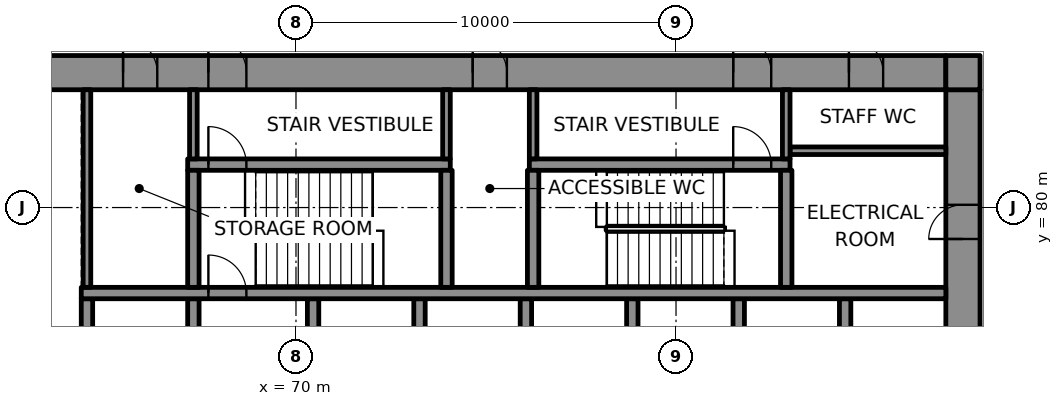
"""IFC4 building model, lengths in metres.
Left out: names, types, materials, properties, quantities, classifications, styles, units other than length and angle.
Written with IfcOpenShell. Run it as: python <this file> out.ifc"""

import sys

from ifc_helpers import new_model, si_unit, direction, frame, frame_2d, origin, place, context, subcontext, project, spatial, rectangle, extrude, element, fill, save


model = new_model("IFC4")
c1 = context("Model", 3, precision=1e-05, world=origin(), true_north=direction((0.0, 1.0)))
c2 = subcontext(c1, "Body", "Model", "MODEL_VIEW")
j1 = project(units=[si_unit("LENGTHUNIT", "METRE"), si_unit("PLANEANGLEUNIT", "RADIAN")], contexts=[c1])
p1 = place(None, origin())
s1 = spatial("IfcSite", under=j1, at=p1, CompositionType="ELEMENT")
p2 = place(p1, origin())
s2 = spatial("IfcBuilding", under=s1, at=p2, CompositionType="ELEMENT")
p3 = place(p2, frame((0.0, 0.0, 132.4)))
s3 = spatial("IfcBuildingStorey", under=s2, at=p3, CompositionType="ELEMENT", Elevation=132.4)
p4 = place(p3, frame((62.0, 83.55, 0.0), z_axis=(0.0, 0.0, 1.0), x_axis=(1.0, 0.0, 0.0)))
e1 = element("IfcWall", 1, at=p4, inside=s3, PredefinedType="SHEAR", context=c2, shape_type="SweptSolid", body=[
    extrude(rectangle(XDim=25.1, YDim=0.9, at=frame_2d((12.55, 0.0))), origin(), (0.0, 0.0, 1.0), 4.0),
])
p5 = place(p4, frame((5.695, 0.0, 0.0)))
e2 = element("IfcOpeningElement", 2, at=p5, cuts=e1, PredefinedType="OPENING", context=c2, shape_type="SweptSolid", body=[
    extrude(rectangle(XDim=1.0, YDim=2.1, at=frame_2d((0.5, 1.05))), frame((0.0, 0.46, 0.0), z_axis=(0.0, -1.0, 0.0), x_axis=(1.0, 0.0, 0.0)), (0.0, 0.0, 1.0), 0.92),
])
p6 = place(p4, frame((19.505, 0.0, 0.0)))
e3 = element("IfcOpeningElement", 3, at=p6, cuts=e1, PredefinedType="OPENING", context=c2, shape_type="SweptSolid", body=[
    extrude(rectangle(XDim=1.0, YDim=2.1, at=frame_2d((0.5, 1.05))), frame((0.0, 0.46, 0.0), z_axis=(0.0, -1.0, 0.0), x_axis=(1.0, 0.0, 0.0)), (0.0, 0.0, 1.0), 0.92),
])
p7 = place(p4, frame((3.45, 0.0, 0.0)))
e4 = element("IfcOpeningElement", 4, at=p7, cuts=e1, PredefinedType="OPENING", context=c2, shape_type="SweptSolid", body=[
    extrude(rectangle(XDim=0.9, YDim=2.1, at=frame_2d((0.45, 1.05))), frame((0.0, 0.46, 0.0), z_axis=(0.0, -1.0, 0.0), x_axis=(1.0, 0.0, 0.0)), (0.0, 0.0, 1.0), 0.92),
])
p8 = place(p4, frame((12.65, 0.0, 0.0)))
e5 = element("IfcOpeningElement", 5, at=p8, cuts=e1, PredefinedType="OPENING", context=c2, shape_type="SweptSolid", body=[
    extrude(rectangle(XDim=0.9, YDim=2.1, at=frame_2d((0.45, 1.05))), frame((0.0, 0.46, 0.0), z_axis=(0.0, -1.0, 0.0), x_axis=(1.0, 0.0, 0.0)), (0.0, 0.0, 1.0), 0.92),
])
p9 = place(p4, frame((22.55, 0.0, 0.0)))
e6 = element("IfcOpeningElement", 6, at=p9, cuts=e1, PredefinedType="OPENING", context=c2, shape_type="SweptSolid", body=[
    extrude(rectangle(XDim=0.9, YDim=2.1, at=frame_2d((0.45, 1.05))), frame((0.0, 0.46, 0.0), z_axis=(0.0, -1.0, 0.0), x_axis=(1.0, 0.0, 0.0)), (0.0, 0.0, 1.0), 0.92),
])
p10 = place(p3, frame((87.55, 66.9, 0.0), z_axis=(0.0, 0.0, 1.0), x_axis=(0.0, 1.0, 0.0)))
e7 = element("IfcWall", 7, at=p10, inside=s3, PredefinedType="SHEAR", context=c2, shape_type="SweptSolid", body=[
    extrude(rectangle(XDim=16.2, YDim=0.9, at=frame_2d((8.1, 0.0))), origin(), (0.0, 0.0, 1.0), 4.0),
])
p11 = place(p10, frame((5.5, 0.0, 0.0)))
e8 = element("IfcOpeningElement", 8, at=p11, cuts=e7, PredefinedType="OPENING", context=c2, shape_type="SweptSolid", body=[
    extrude(rectangle(XDim=1.8, YDim=2.1, at=frame_2d((0.9, 1.05))), frame((0.0, 0.46, 0.0), z_axis=(0.0, -1.0, 0.0), x_axis=(1.0, 0.0, 0.0)), (0.0, 0.0, 1.0), 0.92),
])
p12 = place(p10, frame((12.272, 0.0, 0.0)))
e9 = element("IfcOpeningElement", 9, at=p12, cuts=e7, PredefinedType="OPENING", context=c2, shape_type="SweptSolid", body=[
    extrude(rectangle(XDim=0.9, YDim=2.1, at=frame_2d((0.45, 1.05))), frame((0.0, 0.46, 0.0), z_axis=(0.0, -1.0, 0.0), x_axis=(1.0, 0.0, 0.0)), (0.0, 0.0, 1.0), 0.92),
])
for number, where, z_axis, x_axis in (
    (10, (64.5, 75.0, 0.0), (0.0, 0.0, 1.0), (0.0, 1.0, 0.0)),
    (11, (67.3, 75.0, 0.0), (0.0, 0.0, 1.0), (0.0, 1.0, 0.0)),
):
    element("IfcWall", number, at=place(p3, frame(where, z_axis=z_axis, x_axis=x_axis)), inside=s3, PredefinedType="SHEAR", context=c2, shape_type="SweptSolid", body=[
        extrude(rectangle(XDim=2.6, YDim=0.3, at=frame_2d((1.3, 0.0))), origin(), (0.0, 0.0, 1.0), 4.0),
    ])
p13 = place(p3, frame((70.45, 75.0, 0.0), z_axis=(0.0, 0.0, 1.0), x_axis=(0.0, 1.0, 0.0)))
e12 = element("IfcWall", 12, at=p13, inside=s3, PredefinedType="SHEAR", context=c2, shape_type="SweptSolid", body=[
    extrude(rectangle(XDim=2.6, YDim=0.3, at=frame_2d((1.3, 0.0))), origin(), (0.0, 0.0, 1.0), 4.0),
])
p14 = place(p13, frame((0.15, 0.0, 0.0)))
e13 = element("IfcOpeningElement", 13, at=p14, cuts=e12, PredefinedType="OPENING", context=c2, shape_type="SweptSolid", body=[
    extrude(rectangle(XDim=1.1, YDim=2.1, at=frame_2d((0.55, 1.05))), frame((0.0, 0.16, 0.0), z_axis=(0.0, -1.0, 0.0), x_axis=(1.0, 0.0, 0.0)), (0.0, 0.0, 1.0), 0.32),
])
for number, where, z_axis, x_axis in (
    (14, (73.25, 75.0, 0.0), (0.0, 0.0, 1.0), (0.0, 1.0, 0.0)),
    (15, (76.05, 75.0, 0.0), (0.0, 0.0, 1.0), (0.0, 1.0, 0.0)),
    (16, (78.85, 75.0, 0.0), (0.0, 0.0, 1.0), (0.0, 1.0, 0.0)),
    (17, (81.65, 75.0, 0.0), (0.0, 0.0, 1.0), (0.0, 1.0, 0.0)),
    (18, (84.45, 75.0, 0.0), (0.0, 0.0, 1.0), (0.0, 1.0, 0.0)),
):
    element("IfcWall", number, at=place(p3, frame(where, z_axis=z_axis, x_axis=x_axis)), inside=s3, PredefinedType="SHEAR", context=c2, shape_type="SweptSolid", body=[
        extrude(rectangle(XDim=2.6, YDim=0.3, at=frame_2d((1.3, 0.0))), origin(), (0.0, 0.0, 1.0), 4.0),
    ])
p15 = place(p3, frame((64.35, 77.75, 0.0), z_axis=(0.0, 0.0, 1.0), x_axis=(1.0, 0.0, 0.0)))
e19 = element("IfcWall", 19, at=p15, inside=s3, PredefinedType="SHEAR", context=c2, shape_type="SweptSolid", body=[
    extrude(rectangle(XDim=22.75, YDim=0.3, at=frame_2d((11.375, 0.0))), origin(), (0.0, 0.0, 1.0), 4.0),
])
p16 = place(p15, frame((3.345, 0.0, 0.0)))
e20 = element("IfcOpeningElement", 20, at=p16, cuts=e19, PredefinedType="OPENING", context=c2, shape_type="SweptSolid", body=[
    extrude(rectangle(XDim=1.0, YDim=2.1, at=frame_2d((0.5, 1.05))), frame((0.0, 0.16, 0.0), z_axis=(0.0, -1.0, 0.0), x_axis=(1.0, 0.0, 0.0)), (0.0, 0.0, 1.0), 0.32),
])
p17 = place(p3, frame((67.15, 81.13, 0.0), z_axis=(0.0, 0.0, 1.0), x_axis=(1.0, 0.0, 0.0)))
e21 = element("IfcWall", 21, at=p17, inside=s3, PredefinedType="SHEAR", context=c2, shape_type="SweptSolid", body=[
    extrude(rectangle(XDim=6.91, YDim=0.3, at=frame_2d((3.455, 0.0))), origin(), (0.0, 0.0, 1.0), 4.0),
])
p18 = place(p17, frame((0.545, 0.0, 0.0)))
e22 = element("IfcOpeningElement", 22, at=p18, cuts=e21, PredefinedType="OPENING", context=c2, shape_type="SweptSolid", body=[
    extrude(rectangle(XDim=1.0, YDim=2.1, at=frame_2d((0.5, 1.05))), frame((0.0, 0.16, 0.0), z_axis=(0.0, -1.0, 0.0), x_axis=(1.0, 0.0, 0.0)), (0.0, 0.0, 1.0), 0.32),
])
p19 = place(p3, frame((76.14, 81.13, 0.0), z_axis=(0.0, 0.0, 1.0), x_axis=(1.0, 0.0, 0.0)))
e23 = element("IfcWall", 23, at=p19, inside=s3, PredefinedType="SHEAR", context=c2, shape_type="SweptSolid", body=[
    extrude(rectangle(XDim=6.86, YDim=0.3, at=frame_2d((3.43, 0.0))), origin(), (0.0, 0.0, 1.0), 4.0),
])
p20 = place(p19, frame((5.365, 0.0, 0.0)))
e24 = element("IfcOpeningElement", 24, at=p20, cuts=e23, PredefinedType="OPENING", context=c2, shape_type="SweptSolid", body=[
    extrude(rectangle(XDim=1.0, YDim=2.1, at=frame_2d((0.5, 1.05))), frame((0.0, 0.16, 0.0), z_axis=(0.0, -1.0, 0.0), x_axis=(1.0, 0.0, 0.0)), (0.0, 0.0, 1.0), 0.32),
])
for number, where, z_axis, x_axis in (
    (25, (67.3, 77.9, 0.0), (0.0, 0.0, 1.0), (0.0, 1.0, 0.0)),
    (26, (73.96, 77.9, 0.0), (0.0, 0.0, 1.0), (0.0, 1.0, 0.0)),
    (27, (76.24, 77.9, 0.0), (0.0, 0.0, 1.0), (0.0, 1.0, 0.0)),
    (28, (82.9, 77.9, 0.0), (0.0, 0.0, 1.0), (0.0, 1.0, 0.0)),
):
    element("IfcWall", number, at=place(p3, frame(where, z_axis=z_axis, x_axis=x_axis)), inside=s3, PredefinedType="SHEAR", context=c2, shape_type="SweptSolid", body=[
        extrude(rectangle(XDim=3.08, YDim=0.3, at=frame_2d((1.54, 0.0))), origin(), (0.0, 0.0, 1.0), 4.0),
    ])
p21 = place(p3, frame((87.1, 83.55, 0.0), z_axis=(0.0, 0.0, 1.0), x_axis=(1.0, 0.0, 0.0)))
e29 = element("IfcWall", 29, at=p21, inside=s3, PredefinedType="SHEAR", context=c2, shape_type="SweptSolid", body=[
    extrude(rectangle(XDim=0.9, YDim=0.9, at=frame_2d((0.45, 0.0))), origin(), (0.0, 0.0, 1.0), 4.0),
])
p22 = place(p3, frame((83.0, 81.495, 0.0), z_axis=(0.0, 0.0, 1.0), x_axis=(1.0, 0.0, 0.0)))
e30 = element("IfcWall", 30, at=p22, inside=s3, PredefinedType="PARTITIONING", context=c2, shape_type="SweptSolid", body=[
    extrude(rectangle(XDim=4.1, YDim=0.2, at=frame_2d((2.05, 0.0))), origin(), (0.0, 0.0, 1.0), 4.0),
])
p23 = place(p3, frame((64.5, 77.9, 0.0), z_axis=(0.0, 0.0, 1.0), x_axis=(0.0, 1.0, 0.0)))
e31 = element("IfcWall", 31, at=p23, inside=s3, PredefinedType="PARTITIONING", context=c2, shape_type="SweptSolid", body=[
    extrude(rectangle(XDim=5.2, YDim=0.2, at=frame_2d((2.6, 0.0))), origin(), (0.0, 0.0, 1.0), 4.0),
])
for number, where, z_axis, x_axis in (
    (32, (67.3, 81.28, 0.0), (0.0, 0.0, 1.0), (0.0, 1.0, 0.0)),
    (33, (73.96, 81.28, 0.0), (0.0, 0.0, 1.0), (0.0, 1.0, 0.0)),
    (34, (76.24, 81.28, 0.0), (0.0, 0.0, 1.0), (0.0, 1.0, 0.0)),
    (35, (82.9, 81.28, 0.0), (0.0, 0.0, 1.0), (0.0, 1.0, 0.0)),
):
    element("IfcWall", number, at=place(p3, frame(where, z_axis=z_axis, x_axis=x_axis)), inside=s3, PredefinedType="PARTITIONING", context=c2, shape_type="SweptSolid", body=[
        extrude(rectangle(XDim=1.82, YDim=0.2, at=frame_2d((0.91, 0.0))), origin(), (0.0, 0.0, 1.0), 4.0),
    ])
p24 = place(p16, origin())
e36 = element("IfcDoor", 36, at=p24, inside=s3, OperationType="SINGLE_SWING_LEFT", PredefinedType="DOOR", context=c2, shape_type="SweptSolid", body=[
    extrude(rectangle(XDim=1.0, YDim=2.1, at=frame_2d((0.5, 1.05))), frame((0.0, 0.025, 0.0), z_axis=(0.0, -1.0, 0.0), x_axis=(1.0, 0.0, 0.0)), (0.0, 0.0, 1.0), 0.05),
])
fill(e20, e36)
p25 = place(p18, origin())
e37 = element("IfcDoor", 37, at=p25, inside=s3, OperationType="SINGLE_SWING_RIGHT", PredefinedType="DOOR", context=c2, shape_type="SweptSolid", body=[
    extrude(rectangle(XDim=1.0, YDim=2.1, at=frame_2d((0.5, 1.05))), frame((0.0, 0.025, 0.0), z_axis=(0.0, -1.0, 0.0), x_axis=(1.0, 0.0, 0.0)), (0.0, 0.0, 1.0), 0.05),
])
fill(e22, e37)
p26 = place(p5, origin())
e38 = element("IfcDoor", 38, at=p26, inside=s3, OperationType="SINGLE_SWING_LEFT", PredefinedType="DOOR", context=c2, shape_type="SweptSolid", body=[
    extrude(rectangle(XDim=1.0, YDim=2.1, at=frame_2d((0.5, 1.05))), frame((0.0, 0.17, 0.0), z_axis=(0.0, -1.0, 0.0), x_axis=(1.0, 0.0, 0.0)), (0.0, 0.0, 1.0), 0.34),
])
fill(e2, e38)
p27 = place(p20, origin())
e39 = element("IfcDoor", 39, at=p27, inside=s3, OperationType="SINGLE_SWING_RIGHT", PredefinedType="DOOR", context=c2, shape_type="SweptSolid", body=[
    extrude(rectangle(XDim=1.0, YDim=2.1, at=frame_2d((0.5, 1.05))), frame((0.0, 0.025, 0.0), z_axis=(0.0, -1.0, 0.0), x_axis=(1.0, 0.0, 0.0)), (0.0, 0.0, 1.0), 0.05),
])
fill(e24, e39)
p28 = place(p6, origin())
e40 = element("IfcDoor", 40, at=p28, inside=s3, OperationType="SINGLE_SWING_LEFT", PredefinedType="DOOR", context=c2, shape_type="SweptSolid", body=[
    extrude(rectangle(XDim=1.0, YDim=2.1, at=frame_2d((0.5, 1.05))), frame((0.0, 0.17, 0.0), z_axis=(0.0, -1.0, 0.0), x_axis=(1.0, 0.0, 0.0)), (0.0, 0.0, 1.0), 0.34),
])
fill(e3, e40)
p29 = place(p7, origin())
e41 = element("IfcDoor", 41, at=p29, inside=s3, OperationType="SINGLE_SWING_RIGHT", PredefinedType="DOOR", context=c2, shape_type="SweptSolid", body=[
    extrude(rectangle(XDim=0.9, YDim=2.1, at=frame_2d((0.45, 1.05))), frame((0.0, 0.17, 0.0), z_axis=(0.0, -1.0, 0.0), x_axis=(1.0, 0.0, 0.0)), (0.0, 0.0, 1.0), 0.34),
])
fill(e4, e41)
p30 = place(p8, origin())
e42 = element("IfcDoor", 42, at=p30, inside=s3, OperationType="SINGLE_SWING_LEFT", PredefinedType="DOOR", context=c2, shape_type="SweptSolid", body=[
    extrude(rectangle(XDim=0.9, YDim=2.1, at=frame_2d((0.45, 1.05))), frame((0.0, 0.17, 0.0), z_axis=(0.0, -1.0, 0.0), x_axis=(1.0, 0.0, 0.0)), (0.0, 0.0, 1.0), 0.34),
])
fill(e5, e42)
p31 = place(p12, origin())
e43 = element("IfcDoor", 43, at=p31, inside=s3, OperationType="SINGLE_SWING_RIGHT", PredefinedType="DOOR", context=c2, shape_type="SweptSolid", body=[
    extrude(rectangle(XDim=0.9, YDim=2.1, at=frame_2d((0.45, 1.05))), frame((0.0, 0.17, 0.0), z_axis=(0.0, -1.0, 0.0), x_axis=(1.0, 0.0, 0.0)), (0.0, 0.0, 1.0), 0.34),
])
fill(e9, e43)
p32 = place(p9, origin())
e44 = element("IfcDoor", 44, at=p32, inside=s3, OperationType="SINGLE_SWING_LEFT", PredefinedType="DOOR", context=c2, shape_type="SweptSolid", body=[
    extrude(rectangle(XDim=0.9, YDim=2.1, at=frame_2d((0.45, 1.05))), frame((0.0, 0.17, 0.0), z_axis=(0.0, -1.0, 0.0), x_axis=(1.0, 0.0, 0.0)), (0.0, 0.0, 1.0), 0.34),
])
fill(e6, e44)
save(model, sys.argv[1])
